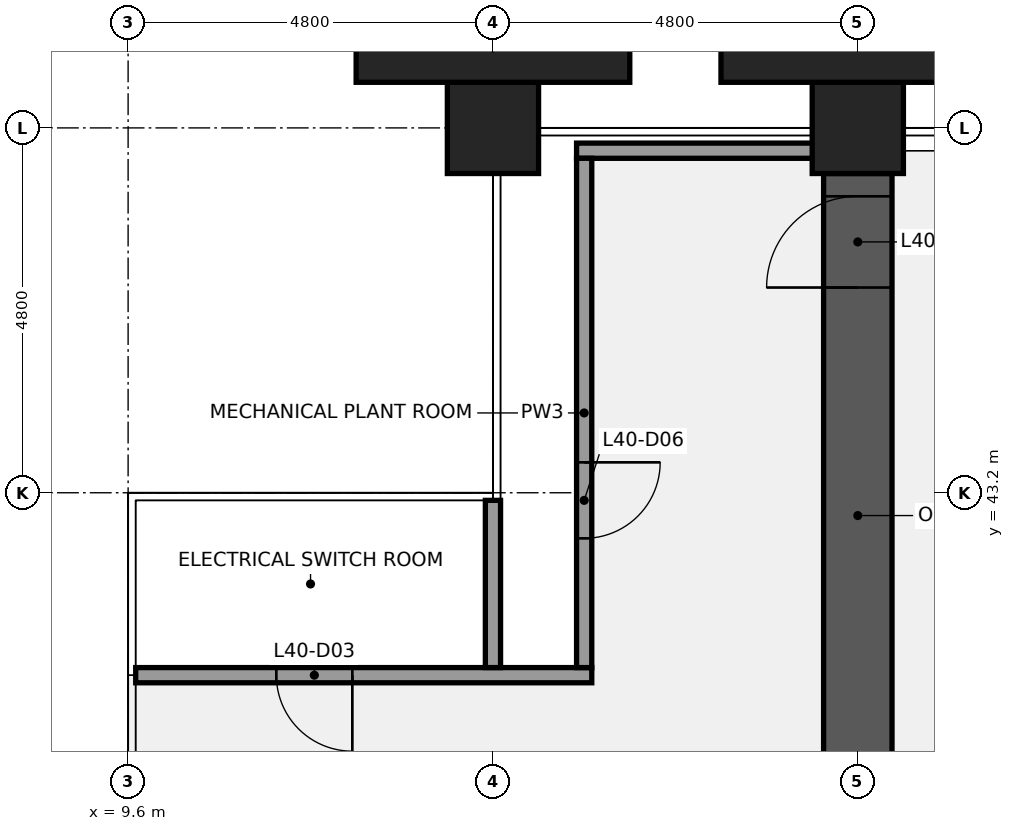
"""IFC4 building model, lengths in metres.
Left out: names, types, materials, properties, quantities, classifications, styles, units other than length and angle.
Written with IfcOpenShell. Run it as: python <this file> out.ifc"""

import sys

from ifc_helpers import new_model, si_unit, direction, frame, frame_2d, origin, origin_2d, place, context, subcontext, project, spatial, rectangle, extrude, element, fill, save


model = new_model("IFC4")
c1 = context("Model", 3, precision=1e-05, world=origin(), true_north=direction((0.0, 1.0)))
c2 = subcontext(c1, "Body", "Model", "MODEL_VIEW")
j1 = project(units=[si_unit("LENGTHUNIT", "METRE"), si_unit("PLANEANGLEUNIT", "RADIAN")], contexts=[c1])
p1 = place(None, origin())
s1 = spatial("IfcSite", under=j1, at=p1, CompositionType="ELEMENT")
p2 = place(p1, origin())
s2 = spatial("IfcBuilding", under=s1, at=p2, CompositionType="ELEMENT")
p3 = place(p2, frame((0.0, 0.0, 180.6)))
s3 = spatial("IfcBuildingStorey", under=s2, at=p3, CompositionType="ELEMENT", Elevation=180.6)
for number, where, z_axis, x_axis in (
    (1, (14.4, 48.0, 0.0), (0.0, 0.0, 1.0), (1.0, 0.0, 0.0)),
    (2, (19.2, 48.0, 0.0), (0.0, 0.0, 1.0), (1.0, 0.0, 0.0)),
):
    element("IfcColumn", number, at=place(p3, frame(where, z_axis=z_axis, x_axis=x_axis)), inside=s3, PredefinedType="COLUMN", context=c2, shape_type="SweptSolid", body=[
        extrude(rectangle(XDim=1.2, YDim=1.2, at=origin_2d()), origin(), (0.0, 0.0, 1.0), 12.6),
    ])
p4 = place(p3, frame((19.2, 38.4, 0.0), z_axis=(0.0, 0.0, 1.0), x_axis=(0.0, 1.0, 0.0)))
e3 = element("IfcWall", 3, at=p4, inside=s3, PredefinedType="SHEAR", context=c2, shape_type="SweptSolid", body=[
    extrude(rectangle(XDim=9.0, YDim=0.9, at=frame_2d((4.5, 0.0))), origin(), (0.0, 0.0, 1.0), 12.3),
])
p5 = place(p4, frame((7.5, 0.0, 0.0)))
e4 = element("IfcOpeningElement", 4, at=p5, cuts=e3, PredefinedType="OPENING", context=c2, shape_type="SweptSolid", body=[
    extrude(rectangle(XDim=1.2, YDim=2.1, at=frame_2d((0.6, 1.05))), frame((0.0, 0.46, 0.0), z_axis=(0.0, -1.0, 0.0), x_axis=(1.0, 0.0, 0.0)), (0.0, 0.0, 1.0), 0.92),
])
p6 = place(p3, frame((9.7, 40.8, 0.0), z_axis=(0.0, 0.0, 1.0), x_axis=(1.0, 0.0, 0.0)))
e5 = element("IfcWall", 5, at=p6, inside=s3, PredefinedType="PARTITIONING", context=c2, shape_type="SweptSolid", body=[
    extrude(rectangle(XDim=6.0, YDim=0.2, at=frame_2d((3.0, 0.0))), origin(), (0.0, 0.0, 1.0), 11.309),
])
p7 = place(p6, frame((1.85, 0.0, 0.0)))
e6 = element("IfcOpeningElement", 6, at=p7, cuts=e5, PredefinedType="OPENING", context=c2, shape_type="SweptSolid", body=[
    extrude(rectangle(XDim=1.0, YDim=2.1, at=frame_2d((0.5, 1.05))), frame((0.0, 0.11, 0.0), z_axis=(0.0, -1.0, 0.0), x_axis=(1.0, 0.0, 0.0)), (0.0, 0.0, 1.0), 0.22),
])
p8 = place(p3, frame((15.5, 47.7, 0.0), z_axis=(0.0, 0.0, 1.0), x_axis=(1.0, 0.0, 0.0)))
e7 = element("IfcWall", 7, at=p8, inside=s3, PredefinedType="PARTITIONING", context=c2, shape_type="SweptSolid", body=[
    extrude(rectangle(XDim=3.8, YDim=0.2, at=frame_2d((1.9, 0.0))), origin(), (0.0, 0.0, 1.0), 11.309),
])
p9 = place(p3, frame((14.4, 40.9, 0.0), z_axis=(0.0, 0.0, 1.0), x_axis=(0.0, 1.0, 0.0)))
e8 = element("IfcWall", 8, at=p9, inside=s3, PredefinedType="PARTITIONING", context=c2, shape_type="SweptSolid", body=[
    extrude(rectangle(XDim=2.2, YDim=0.2, at=frame_2d((1.1, 0.0))), origin(), (0.0, 0.0, 1.0), 11.309),
])
p10 = place(p3, frame((15.6, 40.9, 0.0), z_axis=(0.0, 0.0, 1.0), x_axis=(0.0, 1.0, 0.0)))
e9 = element("IfcWall", 9, at=p10, inside=s3, PredefinedType="PARTITIONING", context=c2, shape_type="SweptSolid", body=[
    extrude(rectangle(XDim=6.7, YDim=0.2, at=frame_2d((3.35, 0.0))), origin(), (0.0, 0.0, 1.0), 11.309),
])
p11 = place(p10, frame((1.7, 0.0, 0.0)))
e10 = element("IfcOpeningElement", 10, at=p11, cuts=e9, PredefinedType="OPENING", context=c2, shape_type="SweptSolid", body=[
    extrude(rectangle(XDim=1.0, YDim=2.1, at=frame_2d((0.5, 1.05))), frame((0.0, 0.11, 0.0), z_axis=(0.0, -1.0, 0.0), x_axis=(1.0, 0.0, 0.0)), (0.0, 0.0, 1.0), 0.22),
])
for number, where, z_axis, x_axis in (
    (11, (14.4, 49.05, 0.0), (0.0, 0.0, 1.0), (1.0, 0.0, 0.0)),
    (12, (19.2, 49.05, 0.0), (0.0, 0.0, 1.0), (1.0, 0.0, 0.0)),
):
    element("IfcColumn", number, at=place(p3, frame(where, z_axis=z_axis, x_axis=x_axis)), inside=s3, PredefinedType="PILASTER", context=c2, shape_type="SweptSolid", body=[
        extrude(rectangle(XDim=3.6, YDim=0.9, at=origin_2d()), origin(), (0.0, 0.0, 1.0), 12.6),
    ])
p12 = place(p7, origin())
e13 = element("IfcDoor", 13, at=p12, inside=s3, OperationType="SINGLE_SWING_RIGHT", PredefinedType="DOOR", context=c2, shape_type="SweptSolid", body=[
    extrude(rectangle(XDim=1.0, YDim=2.1, at=frame_2d((0.5, 1.05))), frame((0.0, 0.025, 0.0), z_axis=(0.0, -1.0, 0.0), x_axis=(1.0, 0.0, 0.0)), (0.0, 0.0, 1.0), 0.05),
])
fill(e6, e13)
p13 = place(p11, origin())
e14 = element("IfcDoor", 14, at=p13, inside=s3, OperationType="SINGLE_SWING_RIGHT", PredefinedType="DOOR", context=c2, shape_type="SweptSolid", body=[
    extrude(rectangle(XDim=1.0, YDim=2.1, at=frame_2d((0.5, 1.05))), frame((0.0, 0.025, 0.0), z_axis=(0.0, -1.0, 0.0), x_axis=(1.0, 0.0, 0.0)), (0.0, 0.0, 1.0), 0.05),
])
fill(e10, e14)
p14 = place(p5, origin())
e15 = element("IfcDoor", 15, at=p14, inside=s3, OperationType="SINGLE_SWING_LEFT", PredefinedType="DOOR", context=c2, shape_type="SweptSolid", body=[
    extrude(rectangle(XDim=1.2, YDim=2.1, at=frame_2d((0.6, 1.05))), frame((0.0, 0.025, 0.0), z_axis=(0.0, -1.0, 0.0), x_axis=(1.0, 0.0, 0.0)), (0.0, 0.0, 1.0), 0.05),
])
fill(e4, e15)
save(model, sys.argv[1])
